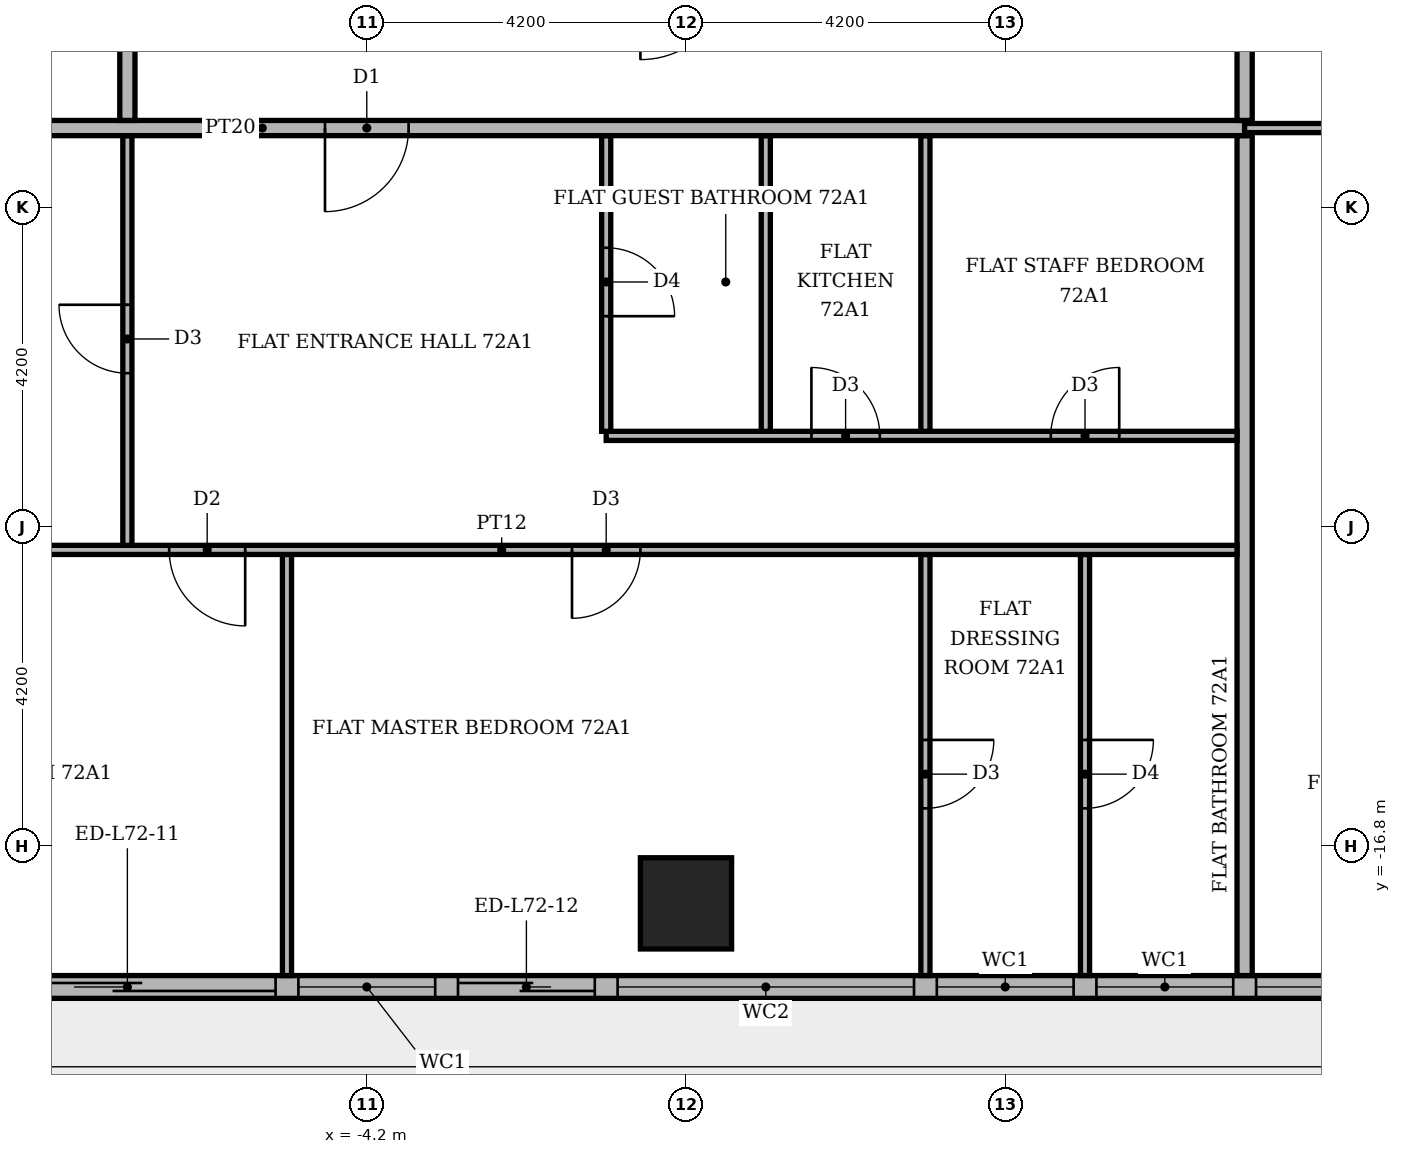
"""IFC4 building model, lengths in metres.
Left out: names, types, materials, properties, quantities, classifications, styles, units other than length and angle.
Written with IfcOpenShell. Run it as: python <this file> out.ifc"""

import sys

from ifc_helpers import new_model, si_unit, direction, frame, frame_2d, origin, origin_2d, place, context, subcontext, project, spatial, rectangle, extrude, element, fill, save


model = new_model("IFC4")
c1 = context("Model", 3, precision=1e-05, world=origin(), true_north=direction((0.0, 1.0)))
c2 = subcontext(c1, "Body", "Model", "MODEL_VIEW")
j1 = project(units=[si_unit("LENGTHUNIT", "METRE"), si_unit("PLANEANGLEUNIT", "RADIAN")], contexts=[c1])
p1 = place(None, origin())
s1 = spatial("IfcSite", under=j1, at=p1, CompositionType="ELEMENT")
p2 = place(p1, origin())
s2 = spatial("IfcBuilding", under=s1, at=p2, CompositionType="ELEMENT")
p3 = place(p2, frame((0.0, 0.0, 300.6)))
s3 = spatial("IfcBuildingStorey", under=s2, at=p3, CompositionType="ELEMENT", Elevation=300.6)
p4 = place(p3, frame((0.0, -17.55, -0.35), z_axis=(0.0, 0.0, 1.0), x_axis=(1.0, 0.0, 0.0)))
e1 = element("IfcColumn", 1, at=p4, inside=s3, PredefinedType="COLUMN", context=c2, shape_type="SweptSolid", body=[
    extrude(rectangle(XDim=1.2, YDim=1.2, at=origin_2d()), origin(), (0.0, 0.0, 1.0), 4.25),
])
p5 = place(p3, frame((-13.0, -18.65, 0.0), z_axis=(0.0, 0.0, 1.0), x_axis=(1.0, 0.0, 0.0)))
e2 = element("IfcWall", 2, at=p5, inside=s3, PredefinedType="STANDARD", context=c2, shape_type="SweptSolid", body=[
    extrude(rectangle(XDim=26.3, YDim=0.3, at=frame_2d((13.15, 0.0))), origin(), (0.0, 0.0, 1.0), 3.55),
])
p6 = place(p5, frame((1.6, 0.0, 0.6)))
e3 = element("IfcOpeningElement", 3, at=p6, cuts=e2, PredefinedType="OPENING", context=c2, shape_type="SweptSolid", body=[
    extrude(rectangle(XDim=1.8, YDim=2.4, at=frame_2d((0.9, 1.2))), frame((0.0, 0.16, 0.0), z_axis=(0.0, -1.0, 0.0), x_axis=(1.0, 0.0, 0.0)), (0.0, 0.0, 1.0), 0.32),
])
p7 = place(p5, frame((3.7, 0.0, 0.0)))
e4 = element("IfcOpeningElement", 4, at=p7, cuts=e2, PredefinedType="OPENING", context=c2, shape_type="SweptSolid", body=[
    extrude(rectangle(XDim=3.9, YDim=2.4, at=frame_2d((1.95, 1.2))), frame((0.0, 0.16, 0.0), z_axis=(0.0, -1.0, 0.0), x_axis=(1.0, 0.0, 0.0)), (0.0, 0.0, 1.0), 0.32),
])
p8 = place(p5, frame((7.9, 0.0, 0.6)))
e5 = element("IfcOpeningElement", 5, at=p8, cuts=e2, PredefinedType="OPENING", context=c2, shape_type="SweptSolid", body=[
    extrude(rectangle(XDim=1.8, YDim=2.4, at=frame_2d((0.9, 1.2))), frame((0.0, 0.16, 0.0), z_axis=(0.0, -1.0, 0.0), x_axis=(1.0, 0.0, 0.0)), (0.0, 0.0, 1.0), 0.32),
])
p9 = place(p5, frame((10.0, 0.0, 0.0)))
e6 = element("IfcOpeningElement", 6, at=p9, cuts=e2, PredefinedType="OPENING", context=c2, shape_type="SweptSolid", body=[
    extrude(rectangle(XDim=1.8, YDim=2.4, at=frame_2d((0.9, 1.2))), frame((0.0, 0.16, 0.0), z_axis=(0.0, -1.0, 0.0), x_axis=(1.0, 0.0, 0.0)), (0.0, 0.0, 1.0), 0.32),
])
p10 = place(p5, frame((12.1, 0.0, 0.6)))
e7 = element("IfcOpeningElement", 7, at=p10, cuts=e2, PredefinedType="OPENING", context=c2, shape_type="SweptSolid", body=[
    extrude(rectangle(XDim=3.9, YDim=2.4, at=frame_2d((1.95, 1.2))), frame((0.0, 0.16, 0.0), z_axis=(0.0, -1.0, 0.0), x_axis=(1.0, 0.0, 0.0)), (0.0, 0.0, 1.0), 0.32),
])
p11 = place(p5, frame((16.3, 0.0, 0.6)))
e8 = element("IfcOpeningElement", 8, at=p11, cuts=e2, PredefinedType="OPENING", context=c2, shape_type="SweptSolid", body=[
    extrude(rectangle(XDim=1.8, YDim=2.4, at=frame_2d((0.9, 1.2))), frame((0.0, 0.16, 0.0), z_axis=(0.0, -1.0, 0.0), x_axis=(1.0, 0.0, 0.0)), (0.0, 0.0, 1.0), 0.32),
])
p12 = place(p5, frame((18.4, 0.0, 0.6)))
e9 = element("IfcOpeningElement", 9, at=p12, cuts=e2, PredefinedType="OPENING", context=c2, shape_type="SweptSolid", body=[
    extrude(rectangle(XDim=1.8, YDim=2.4, at=frame_2d((0.9, 1.2))), frame((0.0, 0.16, 0.0), z_axis=(0.0, -1.0, 0.0), x_axis=(1.0, 0.0, 0.0)), (0.0, 0.0, 1.0), 0.32),
])
p13 = place(p5, frame((20.5, 0.0, 0.6)))
e10 = element("IfcOpeningElement", 10, at=p13, cuts=e2, PredefinedType="OPENING", context=c2, shape_type="SweptSolid", body=[
    extrude(rectangle(XDim=3.9, YDim=2.4, at=frame_2d((1.95, 1.2))), frame((0.0, 0.16, 0.0), z_axis=(0.0, -1.0, 0.0), x_axis=(1.0, 0.0, 0.0)), (0.0, 0.0, 1.0), 0.32),
])
p14 = place(p3, frame((-5.25, -18.5, 0.0), z_axis=(0.0, 0.0, 1.0), x_axis=(0.0, 1.0, 0.0)))
e11 = element("IfcWall", 11, at=p14, inside=s3, PredefinedType="PARTITIONING", context=c2, shape_type="SweptSolid", body=[
    extrude(rectangle(XDim=5.54, YDim=0.12, at=frame_2d((2.77, 0.0))), origin(), (0.0, 0.0, 1.0), 3.55),
])
p15 = place(p3, frame((3.15, -18.5, 0.0), z_axis=(0.0, 0.0, 1.0), x_axis=(0.0, 1.0, 0.0)))
e12 = element("IfcWall", 12, at=p15, inside=s3, PredefinedType="PARTITIONING", context=c2, shape_type="SweptSolid", body=[
    extrude(rectangle(XDim=5.54, YDim=0.12, at=frame_2d((2.77, 0.0))), origin(), (0.0, 0.0, 1.0), 3.55),
])
p16 = place(p15, frame((2.2, 0.0, 0.0)))
e13 = element("IfcOpeningElement", 13, at=p16, cuts=e12, PredefinedType="OPENING", context=c2, shape_type="SweptSolid", body=[
    extrude(rectangle(XDim=0.9, YDim=2.1, at=frame_2d((0.45, 1.05))), frame((0.0, 0.07, 0.0), z_axis=(0.0, -1.0, 0.0), x_axis=(1.0, 0.0, 0.0)), (0.0, 0.0, 1.0), 0.14),
])
p17 = place(p3, frame((5.25, -18.5, 0.0), z_axis=(0.0, 0.0, 1.0), x_axis=(0.0, 1.0, 0.0)))
e14 = element("IfcWall", 14, at=p17, inside=s3, PredefinedType="PARTITIONING", context=c2, shape_type="SweptSolid", body=[
    extrude(rectangle(XDim=5.54, YDim=0.12, at=frame_2d((2.77, 0.0))), origin(), (0.0, 0.0, 1.0), 3.55),
])
p18 = place(p17, frame((2.2, 0.0, 0.0)))
e15 = element("IfcOpeningElement", 15, at=p18, cuts=e14, PredefinedType="OPENING", context=c2, shape_type="SweptSolid", body=[
    extrude(rectangle(XDim=0.9, YDim=2.1, at=frame_2d((0.45, 1.05))), frame((0.0, 0.07, 0.0), z_axis=(0.0, -1.0, 0.0), x_axis=(1.0, 0.0, 0.0)), (0.0, 0.0, 1.0), 0.14),
])
p19 = place(p3, frame((7.35, -18.5, 0.0), z_axis=(0.0, 0.0, 1.0), x_axis=(0.0, 1.0, 0.0)))
e16 = element("IfcWall", 16, at=p19, inside=s3, PredefinedType="PARTITIONING", context=c2, shape_type="SweptSolid", body=[
    extrude(rectangle(XDim=11.05, YDim=0.2, at=frame_2d((5.525, 0.0))), origin(), (0.0, 0.0, 1.0), 3.55),
])
p20 = place(p3, frame((-12.1, -12.9, 0.0), z_axis=(0.0, 0.0, 1.0), x_axis=(1.0, 0.0, 0.0)))
e17 = element("IfcWall", 17, at=p20, inside=s3, PredefinedType="PARTITIONING", context=c2, shape_type="SweptSolid", body=[
    extrude(rectangle(XDim=19.35, YDim=0.12, at=frame_2d((9.675, 0.0))), origin(), (0.0, 0.0, 1.0), 3.55),
])
p21 = place(p20, frame((5.3, 0.0, 0.0)))
e18 = element("IfcOpeningElement", 18, at=p21, cuts=e17, PredefinedType="OPENING", context=c2, shape_type="SweptSolid", body=[
    extrude(rectangle(XDim=1.0, YDim=2.1, at=frame_2d((0.5, 1.05))), frame((0.0, 0.07, 0.0), z_axis=(0.0, -1.0, 0.0), x_axis=(1.0, 0.0, 0.0)), (0.0, 0.0, 1.0), 0.14),
])
p22 = place(p20, frame((10.6, 0.0, 0.0)))
e19 = element("IfcOpeningElement", 19, at=p22, cuts=e17, PredefinedType="OPENING", context=c2, shape_type="SweptSolid", body=[
    extrude(rectangle(XDim=0.9, YDim=2.1, at=frame_2d((0.45, 1.05))), frame((0.0, 0.07, 0.0), z_axis=(0.0, -1.0, 0.0), x_axis=(1.0, 0.0, 0.0)), (0.0, 0.0, 1.0), 0.14),
])
p23 = place(p3, frame((-7.35, -12.84, 0.0), z_axis=(0.0, 0.0, 1.0), x_axis=(0.0, 1.0, 0.0)))
e20 = element("IfcWall", 20, at=p23, inside=s3, PredefinedType="PARTITIONING", context=c2, shape_type="SweptSolid", body=[
    extrude(rectangle(XDim=5.39, YDim=0.12, at=frame_2d((2.695, 0.0))), origin(), (0.0, 0.0, 1.0), 3.55),
])
p24 = place(p23, frame((2.265, 0.0, 0.0)))
e21 = element("IfcOpeningElement", 21, at=p24, cuts=e20, PredefinedType="OPENING", context=c2, shape_type="SweptSolid", body=[
    extrude(rectangle(XDim=0.9, YDim=2.1, at=frame_2d((0.45, 1.05))), frame((0.0, 0.07, 0.0), z_axis=(0.0, -1.0, 0.0), x_axis=(1.0, 0.0, 0.0)), (0.0, 0.0, 1.0), 0.14),
])
p25 = place(p3, frame((-1.05, -11.4, 0.0), z_axis=(0.0, 0.0, 1.0), x_axis=(1.0, 0.0, 0.0)))
e22 = element("IfcWall", 22, at=p25, inside=s3, PredefinedType="PARTITIONING", context=c2, shape_type="SweptSolid", body=[
    extrude(rectangle(XDim=8.3, YDim=0.12, at=frame_2d((4.15, 0.0))), origin(), (0.0, 0.0, 1.0), 3.55),
])
p26 = place(p25, frame((2.7, 0.0, 0.0)))
e23 = element("IfcOpeningElement", 23, at=p26, cuts=e22, PredefinedType="OPENING", context=c2, shape_type="SweptSolid", body=[
    extrude(rectangle(XDim=0.9, YDim=2.1, at=frame_2d((0.45, 1.05))), frame((0.0, 0.07, 0.0), z_axis=(0.0, -1.0, 0.0), x_axis=(1.0, 0.0, 0.0)), (0.0, 0.0, 1.0), 0.14),
])
p27 = place(p25, frame((5.85, 0.0, 0.0)))
e24 = element("IfcOpeningElement", 24, at=p27, cuts=e22, PredefinedType="OPENING", context=c2, shape_type="SweptSolid", body=[
    extrude(rectangle(XDim=0.9, YDim=2.1, at=frame_2d((0.45, 1.05))), frame((0.0, 0.07, 0.0), z_axis=(0.0, -1.0, 0.0), x_axis=(1.0, 0.0, 0.0)), (0.0, 0.0, 1.0), 0.14),
])
p28 = place(p3, frame((-1.05, -11.34, 0.0), z_axis=(0.0, 0.0, 1.0), x_axis=(0.0, 1.0, 0.0)))
e25 = element("IfcWall", 25, at=p28, inside=s3, PredefinedType="PARTITIONING", context=c2, shape_type="SweptSolid", body=[
    extrude(rectangle(XDim=3.89, YDim=0.12, at=frame_2d((1.945, 0.0))), origin(), (0.0, 0.0, 1.0), 3.55),
])
p29 = place(p28, frame((1.515, 0.0, 0.0)))
e26 = element("IfcOpeningElement", 26, at=p29, cuts=e25, PredefinedType="OPENING", context=c2, shape_type="SweptSolid", body=[
    extrude(rectangle(XDim=0.9, YDim=2.1, at=frame_2d((0.45, 1.05))), frame((0.0, 0.07, 0.0), z_axis=(0.0, -1.0, 0.0), x_axis=(1.0, 0.0, 0.0)), (0.0, 0.0, 1.0), 0.14),
])
for number, where, z_axis, x_axis in (
    (27, (1.05, -11.34, 0.0), (0.0, 0.0, 1.0), (0.0, 1.0, 0.0)),
    (28, (3.15, -11.34, 0.0), (0.0, 0.0, 1.0), (0.0, 1.0, 0.0)),
):
    element("IfcWall", number, at=place(p3, frame(where, z_axis=z_axis, x_axis=x_axis)), inside=s3, PredefinedType="PARTITIONING", context=c2, shape_type="SweptSolid", body=[
        extrude(rectangle(XDim=3.89, YDim=0.12, at=frame_2d((1.945, 0.0))), origin(), (0.0, 0.0, 1.0), 3.55),
    ])
p30 = place(p3, frame((-18.5, -7.35, 0.0), z_axis=(0.0, 0.0, 1.0), x_axis=(1.0, 0.0, 0.0)))
e29 = element("IfcWall", 29, at=p30, inside=s3, PredefinedType="PARTITIONING", context=c2, shape_type="SweptSolid", body=[
    extrude(rectangle(XDim=25.85, YDim=0.2, at=frame_2d((12.925, 0.0))), origin(), (0.0, 0.0, 1.0), 3.55),
])
p31 = place(p30, frame((13.75, 0.0, 0.0)))
e30 = element("IfcOpeningElement", 30, at=p31, cuts=e29, PredefinedType="OPENING", context=c2, shape_type="SweptSolid", body=[
    extrude(rectangle(XDim=1.1, YDim=2.4, at=frame_2d((0.55, 1.2))), frame((0.0, 0.11, 0.0), z_axis=(0.0, -1.0, 0.0), x_axis=(1.0, 0.0, 0.0)), (0.0, 0.0, 1.0), 0.22),
])
p32 = place(p3, frame((7.35, -7.35, 0.0), z_axis=(0.0, 0.0, 1.0), x_axis=(1.0, 0.0, 0.0)))
e31 = element("IfcWall", 31, at=p32, inside=s3, PredefinedType="PARTITIONING", context=c2, shape_type="SweptSolid", body=[
    extrude(rectangle(XDim=6.15, YDim=0.12, at=frame_2d((3.075, 0.0))), origin(), (0.0, 0.0, 1.0), 3.55),
])
p33 = place(p32, frame((2.625, 0.0, 0.0)))
e32 = element("IfcOpeningElement", 32, at=p33, cuts=e31, PredefinedType="OPENING", context=c2, shape_type="SweptSolid", body=[
    extrude(rectangle(XDim=0.9, YDim=2.1, at=frame_2d((0.45, 1.05))), frame((0.0, 0.07, 0.0), z_axis=(0.0, -1.0, 0.0), x_axis=(1.0, 0.0, 0.0)), (0.0, 0.0, 1.0), 0.14),
])
p34 = place(p3, frame((-7.35, -7.25, 0.0), z_axis=(0.0, 0.0, 1.0), x_axis=(0.0, 1.0, 0.0)))
e33 = element("IfcWall", 33, at=p34, inside=s3, PredefinedType="PARTITIONING", context=c2, shape_type="SweptSolid", body=[
    extrude(rectangle(XDim=14.5, YDim=0.2, at=frame_2d((7.25, 0.0))), origin(), (0.0, 0.0, 1.0), 3.55),
])
p35 = place(p34, frame((11.95, 0.0, 0.0)))
e34 = element("IfcOpeningElement", 34, at=p35, cuts=e33, PredefinedType="OPENING", context=c2, shape_type="SweptSolid", body=[
    extrude(rectangle(XDim=1.1, YDim=2.4, at=frame_2d((0.55, 1.2))), frame((0.0, 0.11, 0.0), z_axis=(0.0, -1.0, 0.0), x_axis=(1.0, 0.0, 0.0)), (0.0, 0.0, 1.0), 0.22),
])
p36 = place(p3, frame((7.35, -7.25, 0.0), z_axis=(0.0, 0.0, 1.0), x_axis=(0.0, 1.0, 0.0)))
e35 = element("IfcWall", 35, at=p36, inside=s3, PredefinedType="PARTITIONING", context=c2, shape_type="SweptSolid", body=[
    extrude(rectangle(XDim=14.5, YDim=0.2, at=frame_2d((7.25, 0.0))), origin(), (0.0, 0.0, 1.0), 3.55),
])
p37 = place(p36, frame((2.5, 0.0, 0.0)))
e36 = element("IfcOpeningElement", 36, at=p37, cuts=e35, PredefinedType="OPENING", context=c2, shape_type="SweptSolid", body=[
    extrude(rectangle(XDim=1.1, YDim=2.4, at=frame_2d((0.55, 1.2))), frame((0.0, 0.11, 0.0), z_axis=(0.0, -1.0, 0.0), x_axis=(1.0, 0.0, 0.0)), (0.0, 0.0, 1.0), 0.22),
])
p38 = place(p7, origin())
e37 = element("IfcDoor", 37, at=p38, inside=s3, OperationType="SLIDING_TO_LEFT", PredefinedType="DOOR", context=c2, shape_type="SweptSolid", body=[
    extrude(rectangle(XDim=3.9, YDim=2.4, at=frame_2d((1.95, 1.2))), frame((0.0, 0.025, 0.0), z_axis=(0.0, -1.0, 0.0), x_axis=(1.0, 0.0, 0.0)), (0.0, 0.0, 1.0), 0.05),
])
fill(e4, e37)
p39 = place(p8, origin())
e38 = element("IfcWindow", 38, at=p39, inside=s3, PartitioningType="SINGLE_PANEL", PredefinedType="WINDOW", context=c2, shape_type="SweptSolid", body=[
    extrude(rectangle(XDim=1.8, YDim=2.4, at=frame_2d((0.9, 1.2))), frame((0.0, 0.03, 0.0), z_axis=(0.0, -1.0, 0.0), x_axis=(1.0, 0.0, 0.0)), (0.0, 0.0, 1.0), 0.06),
])
fill(e5, e38)
p40 = place(p9, origin())
e39 = element("IfcDoor", 39, at=p40, inside=s3, OperationType="SLIDING_TO_RIGHT", PredefinedType="DOOR", context=c2, shape_type="SweptSolid", body=[
    extrude(rectangle(XDim=1.8, YDim=2.4, at=frame_2d((0.9, 1.2))), frame((0.0, 0.025, 0.0), z_axis=(0.0, -1.0, 0.0), x_axis=(1.0, 0.0, 0.0)), (0.0, 0.0, 1.0), 0.05),
])
fill(e6, e39)
p41 = place(p10, origin())
e40 = element("IfcWindow", 40, at=p41, inside=s3, PartitioningType="SINGLE_PANEL", PredefinedType="WINDOW", context=c2, shape_type="SweptSolid", body=[
    extrude(rectangle(XDim=3.9, YDim=2.4, at=frame_2d((1.95, 1.2))), frame((0.0, 0.03, 0.0), z_axis=(0.0, -1.0, 0.0), x_axis=(1.0, 0.0, 0.0)), (0.0, 0.0, 1.0), 0.06),
])
fill(e7, e40)
p42 = place(p11, origin())
e41 = element("IfcWindow", 41, at=p42, inside=s3, PartitioningType="SINGLE_PANEL", PredefinedType="WINDOW", context=c2, shape_type="SweptSolid", body=[
    extrude(rectangle(XDim=1.8, YDim=2.4, at=frame_2d((0.9, 1.2))), frame((0.0, 0.03, 0.0), z_axis=(0.0, -1.0, 0.0), x_axis=(1.0, 0.0, 0.0)), (0.0, 0.0, 1.0), 0.06),
])
fill(e8, e41)
p43 = place(p12, origin())
e42 = element("IfcWindow", 42, at=p43, inside=s3, PartitioningType="SINGLE_PANEL", PredefinedType="WINDOW", context=c2, shape_type="SweptSolid", body=[
    extrude(rectangle(XDim=1.8, YDim=2.4, at=frame_2d((0.9, 1.2))), frame((0.0, 0.03, 0.0), z_axis=(0.0, -1.0, 0.0), x_axis=(1.0, 0.0, 0.0)), (0.0, 0.0, 1.0), 0.06),
])
fill(e9, e42)
p44 = place(p13, origin())
e43 = element("IfcWindow", 43, at=p44, inside=s3, PartitioningType="SINGLE_PANEL", PredefinedType="WINDOW", context=c2, shape_type="SweptSolid", body=[
    extrude(rectangle(XDim=3.9, YDim=2.4, at=frame_2d((1.95, 1.2))), frame((0.0, 0.03, 0.0), z_axis=(0.0, -1.0, 0.0), x_axis=(1.0, 0.0, 0.0)), (0.0, 0.0, 1.0), 0.06),
])
fill(e10, e43)
p45 = place(p31, frame((1.1, 0.0, 0.0), z_axis=(0.0, 0.0, 1.0), x_axis=(-1.0, 0.0, 0.0)))
e44 = element("IfcDoor", 44, at=p45, inside=s3, OperationType="SINGLE_SWING_LEFT", PredefinedType="DOOR", context=c2, shape_type="SweptSolid", body=[
    extrude(rectangle(XDim=1.1, YDim=2.4, at=frame_2d((0.55, 1.2))), frame((0.0, 0.025, 0.0), z_axis=(0.0, -1.0, 0.0), x_axis=(1.0, 0.0, 0.0)), (0.0, 0.0, 1.0), 0.05),
])
fill(e30, e44)
p46 = place(p24, origin())
e45 = element("IfcDoor", 45, at=p46, inside=s3, OperationType="SINGLE_SWING_RIGHT", PredefinedType="DOOR", context=c2, shape_type="SweptSolid", body=[
    extrude(rectangle(XDim=0.9, YDim=2.1, at=frame_2d((0.45, 1.05))), frame((0.0, 0.025, 0.0), z_axis=(0.0, -1.0, 0.0), x_axis=(1.0, 0.0, 0.0)), (0.0, 0.0, 1.0), 0.05),
])
fill(e21, e45)
p47 = place(p29, frame((0.9, 0.0, 0.0), z_axis=(0.0, 0.0, 1.0), x_axis=(-1.0, 0.0, 0.0)))
e46 = element("IfcDoor", 46, at=p47, inside=s3, OperationType="SINGLE_SWING_LEFT", PredefinedType="DOOR", context=c2, shape_type="SweptSolid", body=[
    extrude(rectangle(XDim=0.9, YDim=2.1, at=frame_2d((0.45, 1.05))), frame((0.0, 0.025, 0.0), z_axis=(0.0, -1.0, 0.0), x_axis=(1.0, 0.0, 0.0)), (0.0, 0.0, 1.0), 0.05),
])
fill(e26, e46)
p48 = place(p26, origin())
e47 = element("IfcDoor", 47, at=p48, inside=s3, OperationType="SINGLE_SWING_LEFT", PredefinedType="DOOR", context=c2, shape_type="SweptSolid", body=[
    extrude(rectangle(XDim=0.9, YDim=2.1, at=frame_2d((0.45, 1.05))), frame((0.0, 0.025, 0.0), z_axis=(0.0, -1.0, 0.0), x_axis=(1.0, 0.0, 0.0)), (0.0, 0.0, 1.0), 0.05),
])
fill(e23, e47)
p49 = place(p27, origin())
e48 = element("IfcDoor", 48, at=p49, inside=s3, OperationType="SINGLE_SWING_RIGHT", PredefinedType="DOOR", context=c2, shape_type="SweptSolid", body=[
    extrude(rectangle(XDim=0.9, YDim=2.1, at=frame_2d((0.45, 1.05))), frame((0.0, 0.025, 0.0), z_axis=(0.0, -1.0, 0.0), x_axis=(1.0, 0.0, 0.0)), (0.0, 0.0, 1.0), 0.05),
])
fill(e24, e48)
p50 = place(p21, frame((1.0, 0.0, 0.0), z_axis=(0.0, 0.0, 1.0), x_axis=(-1.0, 0.0, 0.0)))
e49 = element("IfcDoor", 49, at=p50, inside=s3, OperationType="SINGLE_SWING_RIGHT", PredefinedType="DOOR", context=c2, shape_type="SweptSolid", body=[
    extrude(rectangle(XDim=1.0, YDim=2.1, at=frame_2d((0.5, 1.05))), frame((0.0, 0.025, 0.0), z_axis=(0.0, -1.0, 0.0), x_axis=(1.0, 0.0, 0.0)), (0.0, 0.0, 1.0), 0.05),
])
fill(e18, e49)
p51 = place(p22, frame((0.9, 0.0, 0.0), z_axis=(0.0, 0.0, 1.0), x_axis=(-1.0, 0.0, 0.0)))
e50 = element("IfcDoor", 50, at=p51, inside=s3, OperationType="SINGLE_SWING_LEFT", PredefinedType="DOOR", context=c2, shape_type="SweptSolid", body=[
    extrude(rectangle(XDim=0.9, YDim=2.1, at=frame_2d((0.45, 1.05))), frame((0.0, 0.025, 0.0), z_axis=(0.0, -1.0, 0.0), x_axis=(1.0, 0.0, 0.0)), (0.0, 0.0, 1.0), 0.05),
])
fill(e19, e50)
p52 = place(p16, frame((0.9, 0.0, 0.0), z_axis=(0.0, 0.0, 1.0), x_axis=(-1.0, 0.0, 0.0)))
e51 = element("IfcDoor", 51, at=p52, inside=s3, OperationType="SINGLE_SWING_RIGHT", PredefinedType="DOOR", context=c2, shape_type="SweptSolid", body=[
    extrude(rectangle(XDim=0.9, YDim=2.1, at=frame_2d((0.45, 1.05))), frame((0.0, 0.025, 0.0), z_axis=(0.0, -1.0, 0.0), x_axis=(1.0, 0.0, 0.0)), (0.0, 0.0, 1.0), 0.05),
])
fill(e13, e51)
p53 = place(p18, frame((0.9, 0.0, 0.0), z_axis=(0.0, 0.0, 1.0), x_axis=(-1.0, 0.0, 0.0)))
e52 = element("IfcDoor", 52, at=p53, inside=s3, OperationType="SINGLE_SWING_RIGHT", PredefinedType="DOOR", context=c2, shape_type="SweptSolid", body=[
    extrude(rectangle(XDim=0.9, YDim=2.1, at=frame_2d((0.45, 1.05))), frame((0.0, 0.025, 0.0), z_axis=(0.0, -1.0, 0.0), x_axis=(1.0, 0.0, 0.0)), (0.0, 0.0, 1.0), 0.05),
])
fill(e15, e52)
save(model, sys.argv[1])
